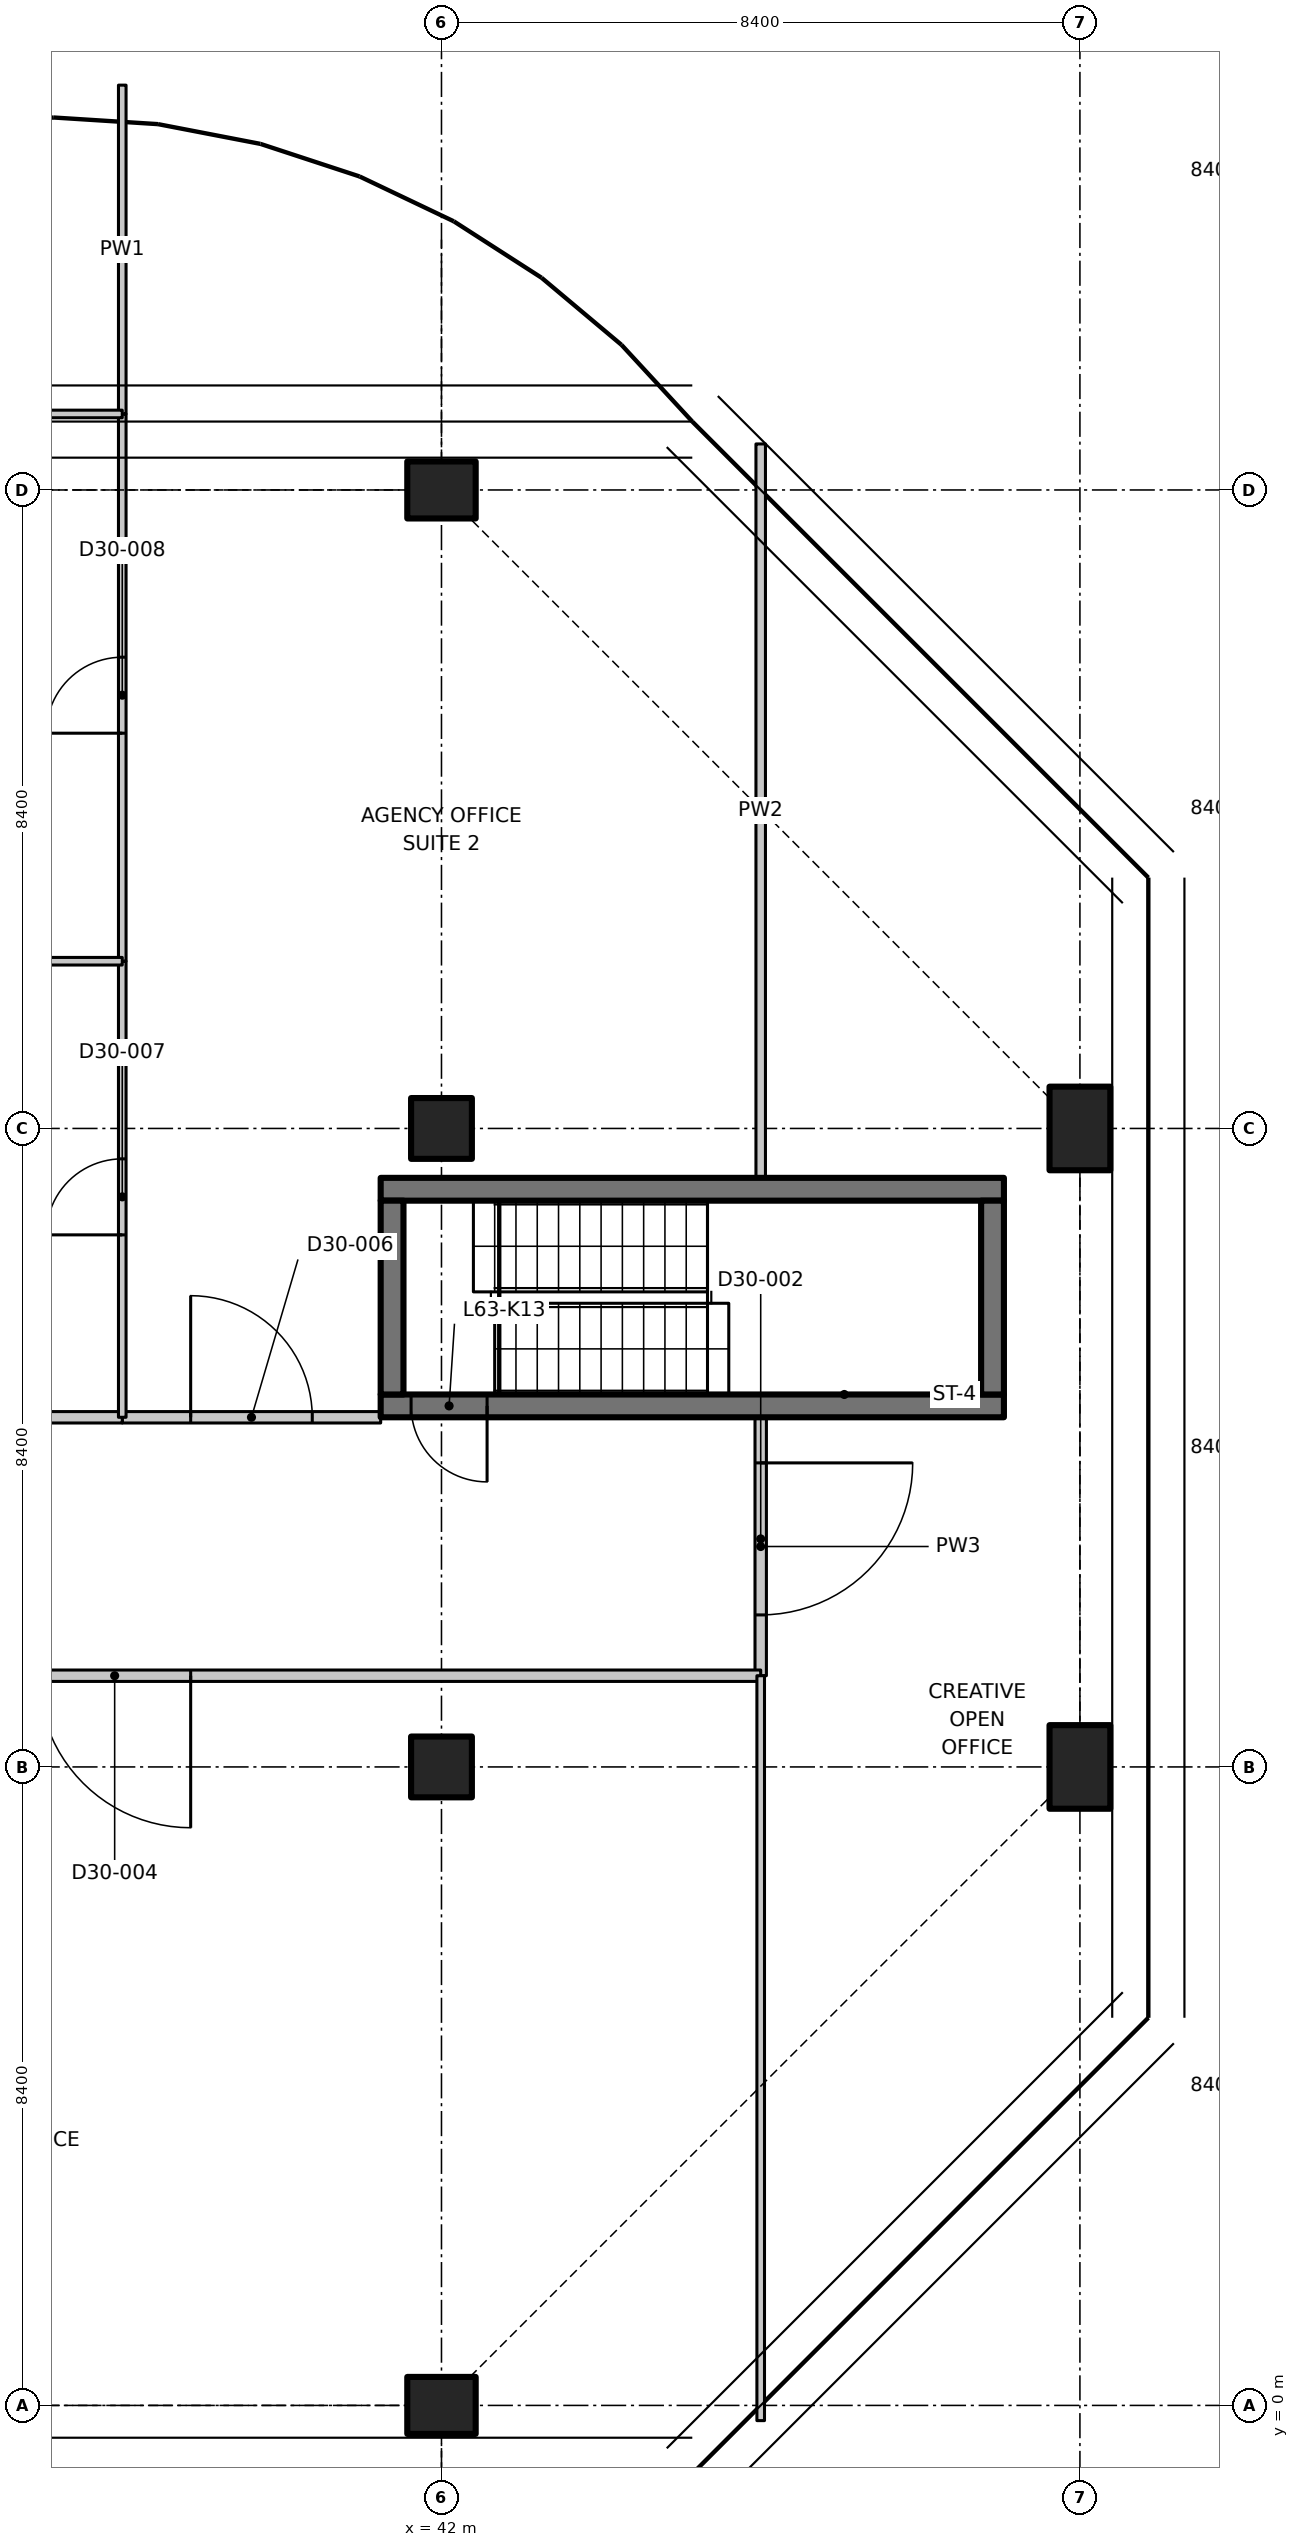
"""IFC4 building model, lengths in metres.
Left out: names, types, materials, properties, quantities, classifications, styles, units other than length and angle.
Written with IfcOpenShell. Run it as: python <this file> out.ifc"""

import sys

from ifc_helpers import new_model, si_unit, direction, frame, frame_2d, origin, origin_2d, place, context, subcontext, project, spatial, polyline, rectangle, outline, extrude, element, fill, save


model = new_model("IFC4")
c1 = context("Model", 3, precision=1e-05, world=origin(), true_north=direction((0.0, 1.0)))
c2 = subcontext(c1, "Body", "Model", "MODEL_VIEW")
j1 = project(units=[si_unit("LENGTHUNIT", "METRE"), si_unit("PLANEANGLEUNIT", "RADIAN")], contexts=[c1])
p1 = place(None, origin())
s1 = spatial("IfcSite", under=j1, at=p1, CompositionType="ELEMENT")
p2 = place(p1, origin())
s2 = spatial("IfcBuilding", under=s1, at=p2, CompositionType="ELEMENT")
p3 = place(p2, frame((0.0, 0.0, 248.1)))
s3 = spatial("IfcBuildingStorey", under=s2, at=p3, CompositionType="ELEMENT", Elevation=248.1)
p4 = place(p3, frame((42.0, 0.0, 0.0), z_axis=(0.0, 0.0, 1.0), x_axis=(0.0, 1.0, 0.0)))
e1 = element("IfcColumn", 1, at=p4, inside=s3, PredefinedType="COLUMN", context=c2, shape_type="SweptSolid", body=[
    extrude(rectangle(XDim=0.75, YDim=0.9, at=origin_2d()), origin(), (0.0, 0.0, 1.0), 3.35),
])
for number, where, z_axis, x_axis in (
    (2, (42.0, 8.4, 0.0), (0.0, 0.0, 1.0), (1.0, 0.0, 0.0)),
    (3, (42.0, 16.8, 0.0), (0.0, 0.0, 1.0), (1.0, 0.0, 0.0)),
):
    element("IfcColumn", number, at=place(p3, frame(where, z_axis=z_axis, x_axis=x_axis)), inside=s3, PredefinedType="COLUMN", context=c2, shape_type="SweptSolid", body=[
        extrude(rectangle(XDim=0.8, YDim=0.8, at=origin_2d()), origin(), (0.0, 0.0, 1.0), 3.35),
    ])
p5 = place(p3, frame((42.0, 25.2, 0.0), z_axis=(0.0, 0.0, 1.0), x_axis=(0.0, 1.0, 0.0)))
e4 = element("IfcColumn", 4, at=p5, inside=s3, PredefinedType="COLUMN", context=c2, shape_type="SweptSolid", body=[
    extrude(rectangle(XDim=0.75, YDim=0.9, at=origin_2d()), origin(), (0.0, 0.0, 1.0), 3.35),
])
for number, where, z_axis, x_axis in (
    (5, (50.4, 8.4, 0.0), (0.0, 0.0, 1.0), (1.0, 0.0, 0.0)),
    (6, (50.4, 16.8, 0.0), (0.0, 0.0, 1.0), (1.0, 0.0, 0.0)),
):
    element("IfcColumn", number, at=place(p3, frame(where, z_axis=z_axis, x_axis=x_axis)), inside=s3, PredefinedType="COLUMN", context=c2, shape_type="SweptSolid", body=[
        extrude(rectangle(XDim=0.8, YDim=1.1, at=origin_2d()), origin(), (0.0, 0.0, 1.0), 3.35),
    ])
p6 = place(p3, frame((49.4, 13.15, 0.0), z_axis=(0.0, 0.0, 1.0), x_axis=(-1.0, 0.0, 0.0)))
e7 = element("IfcWall", 7, at=p6, inside=s3, PredefinedType="SHEAR", context=c2, shape_type="SweptSolid", body=[
    extrude(rectangle(XDim=8.2, YDim=0.3, at=frame_2d((4.1, 0.0))), origin(), (0.0, 0.0, 1.0), 3.35),
])
p7 = place(p6, frame((6.8, 0.0, 0.0)))
e8 = element("IfcOpeningElement", 8, at=p7, cuts=e7, PredefinedType="OPENING", context=c2, shape_type="SweptSolid", body=[
    extrude(rectangle(XDim=1.0, YDim=2.1, at=frame_2d((0.5, 1.05))), frame((0.0, 0.16, 0.0), z_axis=(0.0, -1.0, 0.0), x_axis=(1.0, 0.0, 0.0)), (0.0, 0.0, 1.0), 0.32),
])
p8 = place(p3, frame((41.2, 16.0, 0.0), z_axis=(0.0, 0.0, 1.0), x_axis=(1.0, 0.0, 0.0)))
e9 = element("IfcWall", 9, at=p8, inside=s3, PredefinedType="SHEAR", context=c2, shape_type="SweptSolid", body=[
    extrude(rectangle(XDim=8.2, YDim=0.3, at=frame_2d((4.1, 0.0))), origin(), (0.0, 0.0, 1.0), 3.35),
])
for number, where, z_axis, x_axis in (
    (10, (41.35, 13.3, 0.0), (0.0, 0.0, 1.0), (0.0, 1.0, 0.0)),
    (11, (49.25, 13.3, 0.0), (0.0, 0.0, 1.0), (0.0, 1.0, 0.0)),
):
    element("IfcWall", number, at=place(p3, frame(where, z_axis=z_axis, x_axis=x_axis)), inside=s3, PredefinedType="SHEAR", context=c2, shape_type="SweptSolid", body=[
        extrude(rectangle(XDim=2.55, YDim=0.3, at=frame_2d((1.275, 0.0))), origin(), (0.0, 0.0, 1.0), 3.35),
    ])
p9 = place(p3, frame((46.2, 13.0, 0.0), z_axis=(0.0, 0.0, 1.0), x_axis=(0.0, -1.0, 0.0)))
e12 = element("IfcWall", 12, at=p9, inside=s3, PredefinedType="PARTITIONING", context=c2, shape_type="SweptSolid", body=[
    extrude(rectangle(XDim=3.4, YDim=0.15, at=frame_2d((1.7, 0.0))), origin(), (0.0, 0.0, 1.0), 3.33),
])
p10 = place(p9, frame((0.6, 0.0, 0.0)))
e13 = element("IfcOpeningElement", 13, at=p10, cuts=e12, PredefinedType="OPENING", context=c2, shape_type="SweptSolid", body=[
    extrude(rectangle(XDim=2.0, YDim=2.4, at=frame_2d((1.0, 1.2))), frame((0.0, 0.085, 0.0), z_axis=(0.0, -1.0, 0.0), x_axis=(1.0, 0.0, 0.0)), (0.0, 0.0, 1.0), 0.17),
])
p11 = place(p3, frame((46.2, 9.6, 0.0), z_axis=(0.0, 0.0, 1.0), x_axis=(-1.0, 0.0, 0.0)))
e14 = element("IfcWall", 14, at=p11, inside=s3, PredefinedType="PARTITIONING", context=c2, shape_type="SweptSolid", body=[
    extrude(rectangle(XDim=16.8, YDim=0.15, at=frame_2d((8.4, 0.0))), origin(), (0.0, 0.0, 1.0), 3.33),
])
p12 = place(p11, frame((7.5, 0.0, 0.0)))
e15 = element("IfcOpeningElement", 15, at=p12, cuts=e14, PredefinedType="OPENING", context=c2, shape_type="SweptSolid", body=[
    extrude(rectangle(XDim=2.0, YDim=2.4, at=frame_2d((1.0, 1.2))), frame((0.0, 0.085, 0.0), z_axis=(0.0, -1.0, 0.0), x_axis=(1.0, 0.0, 0.0)), (0.0, 0.0, 1.0), 0.17),
])
p13 = place(p3, frame((37.8, 13.0, 0.0), z_axis=(0.0, 0.0, 1.0), x_axis=(1.0, 0.0, 0.0)))
e16 = element("IfcWall", 16, at=p13, inside=s3, PredefinedType="PARTITIONING", context=c2, shape_type="SweptSolid", body=[
    extrude(rectangle(XDim=3.4, YDim=0.15, at=frame_2d((1.7, 0.0))), origin(), (0.0, 0.0, 1.0), 3.33),
])
p14 = place(p13, frame((0.9, 0.0, 0.0)))
e17 = element("IfcOpeningElement", 17, at=p14, cuts=e16, PredefinedType="OPENING", context=c2, shape_type="SweptSolid", body=[
    extrude(rectangle(XDim=1.6, YDim=2.1, at=frame_2d((0.8, 1.05))), frame((0.0, 0.085, 0.0), z_axis=(0.0, -1.0, 0.0), x_axis=(1.0, 0.0, 0.0)), (0.0, 0.0, 1.0), 0.17),
])
p15 = place(p3, frame((33.6, 13.0, 0.0), z_axis=(0.0, 0.0, 1.0), x_axis=(1.0, 0.0, 0.0)))
e18 = element("IfcWall", 18, at=p15, inside=s3, PredefinedType="PARTITIONING", context=c2, shape_type="SweptSolid", body=[
    extrude(rectangle(XDim=4.2, YDim=0.15, at=frame_2d((2.1, 0.0))), origin(), (0.0, 0.0, 1.0), 3.33),
])
p16 = place(p3, frame((46.2, -0.2, 0.0), z_axis=(0.0, 0.0, 1.0), x_axis=(0.0, 1.0, 0.0)))
e19 = element("IfcWall", 19, at=p16, inside=s3, PredefinedType="PARTITIONING", context=c2, shape_type="SweptSolid", body=[
    extrude(outline(polyline([(0.0, 0.0), (9.8, 0.0), (9.8, 3.33), (5.066, 3.33), (5.064, 2.98), (3.736, 2.98), (3.734, 3.33), (0.0, 3.33), (0.0, 0.0)])), frame((0.0, 0.05, 0.0), z_axis=(0.0, -1.0, 0.0), x_axis=(1.0, 0.0, 0.0)), (0.0, 0.0, 1.0), 0.1),
])
p17 = place(p3, frame((46.2, 16.15, 0.0), z_axis=(0.0, 0.0, 1.0), x_axis=(0.0, 1.0, 0.0)))
e20 = element("IfcWall", 20, at=p17, inside=s3, PredefinedType="PARTITIONING", context=c2, shape_type="SweptSolid", body=[
    extrude(outline(polyline([(0.0, 0.0), (9.656, 0.0), (9.656, 3.33), (9.25, 3.33), (5.528, 3.33), (5.526, 2.98), (4.174, 2.98), (4.172, 3.33), (0.0, 3.33), (0.0, 0.0)])), frame((0.0, 0.062, 0.0), z_axis=(0.0, -1.0, 0.0), x_axis=(1.0, 0.0, 0.0)), (0.0, 0.0, 1.0), 0.125),
])
p18 = place(p3, frame((37.8, 13.0, 0.0), z_axis=(0.0, 0.0, 1.0), x_axis=(0.0, 1.0, 0.0)))
e21 = element("IfcWall", 21, at=p18, inside=s3, PredefinedType="PARTITIONING", context=c2, shape_type="SweptSolid", body=[
    extrude(rectangle(XDim=6.0, YDim=0.1, at=frame_2d((3.0, 0.0))), origin(), (0.0, 0.0, 1.0), 3.33),
])
p19 = place(p18, frame((2.4, 0.0, 0.0)))
e22 = element("IfcOpeningElement", 22, at=p19, cuts=e21, PredefinedType="OPENING", context=c2, shape_type="SweptSolid", body=[
    extrude(rectangle(XDim=1.0, YDim=2.1, at=frame_2d((0.5, 1.05))), frame((0.0, 0.06, 0.0), z_axis=(0.0, -1.0, 0.0), x_axis=(1.0, 0.0, 0.0)), (0.0, 0.0, 1.0), 0.12),
])
p20 = place(p3, frame((37.8, 19.0, 0.0), z_axis=(0.0, 0.0, 1.0), x_axis=(0.0, 1.0, 0.0)))
e23 = element("IfcWall", 23, at=p20, inside=s3, PredefinedType="PARTITIONING", context=c2, shape_type="SweptSolid", body=[
    extrude(outline(polyline([(0.0, 0.0), (7.2, 0.0), (7.2, 3.33), (6.65, 3.33), (6.648, 2.98), (5.752, 2.98), (5.75, 3.33), (0.0, 3.33), (0.0, 0.0)])), frame((0.0, 0.05, 0.0), z_axis=(0.0, -1.0, 0.0), x_axis=(1.0, 0.0, 0.0)), (0.0, 0.0, 1.0), 0.1),
])
p21 = place(p20, frame((3.0, 0.0, 0.0)))
e24 = element("IfcOpeningElement", 24, at=p21, cuts=e23, PredefinedType="OPENING", context=c2, shape_type="SweptSolid", body=[
    extrude(rectangle(XDim=1.0, YDim=2.1, at=frame_2d((0.5, 1.05))), frame((0.0, 0.06, 0.0), z_axis=(0.0, -1.0, 0.0), x_axis=(1.0, 0.0, 0.0)), (0.0, 0.0, 1.0), 0.12),
])
p22 = place(p3, frame((37.8, 26.2, 0.0), z_axis=(0.0, 0.0, 1.0), x_axis=(0.0, 1.0, 0.0)))
e25 = element("IfcWall", 25, at=p22, inside=s3, PredefinedType="PARTITIONING", context=c2, shape_type="SweptSolid", body=[
    extrude(rectangle(XDim=4.326, YDim=0.1, at=frame_2d((2.163, 0.0))), origin(), (0.0, 0.0, 1.0), 3.33),
])
p23 = place(p3, frame((33.6, 19.0, 0.0), z_axis=(0.0, 0.0, 1.0), x_axis=(1.0, 0.0, 0.0)))
e26 = element("IfcWall", 26, at=p23, inside=s3, PredefinedType="PARTITIONING", context=c2, shape_type="SweptSolid", body=[
    extrude(rectangle(XDim=4.2, YDim=0.1, at=frame_2d((2.1, 0.0))), origin(), (0.0, 0.0, 1.0), 3.33),
])
p24 = place(p3, frame((33.6, 26.2, 0.0), z_axis=(0.0, 0.0, 1.0), x_axis=(1.0, 0.0, 0.0)))
e27 = element("IfcWall", 27, at=p24, inside=s3, PredefinedType="PARTITIONING", context=c2, shape_type="SweptSolid", body=[
    extrude(rectangle(XDim=4.2, YDim=0.1, at=frame_2d((2.1, 0.0))), origin(), (0.0, 0.0, 1.0), 2.98),
])
p25 = place(p24, frame((1.8, 0.0, 0.0)))
e28 = element("IfcOpeningElement", 28, at=p25, cuts=e27, PredefinedType="OPENING", context=c2, shape_type="SweptSolid", body=[
    extrude(rectangle(XDim=0.9, YDim=2.1, at=frame_2d((0.45, 1.05))), frame((0.0, 0.06, 0.0), z_axis=(0.0, -1.0, 0.0), x_axis=(1.0, 0.0, 0.0)), (0.0, 0.0, 1.0), 0.12),
])
p26 = place(p7, origin())
e29 = element("IfcDoor", 29, at=p26, inside=s3, OperationType="SINGLE_SWING_RIGHT", PredefinedType="DOOR", context=c2, shape_type="SweptSolid", body=[
    extrude(rectangle(XDim=1.0, YDim=2.1, at=frame_2d((0.5, 1.05))), frame((0.0, 0.025, 0.0), z_axis=(0.0, -1.0, 0.0), x_axis=(1.0, 0.0, 0.0)), (0.0, 0.0, 1.0), 0.05),
])
fill(e8, e29)
p27 = place(p10, origin())
e30 = element("IfcDoor", 30, at=p27, inside=s3, OperationType="DOUBLE_DOOR_SINGLE_SWING", PredefinedType="DOOR", context=c2, shape_type="SweptSolid", body=[
    extrude(rectangle(XDim=2.0, YDim=2.4, at=frame_2d((1.0, 1.2))), frame((0.0, 0.025, 0.0), z_axis=(0.0, -1.0, 0.0), x_axis=(1.0, 0.0, 0.0)), (0.0, 0.0, 1.0), 0.05),
])
fill(e13, e30)
p28 = place(p12, origin())
e31 = element("IfcDoor", 31, at=p28, inside=s3, OperationType="DOUBLE_DOOR_SINGLE_SWING", PredefinedType="DOOR", context=c2, shape_type="SweptSolid", body=[
    extrude(rectangle(XDim=2.0, YDim=2.4, at=frame_2d((1.0, 1.2))), frame((0.0, 0.025, 0.0), z_axis=(0.0, -1.0, 0.0), x_axis=(1.0, 0.0, 0.0)), (0.0, 0.0, 1.0), 0.05),
])
fill(e15, e31)
p29 = place(p14, origin())
e32 = element("IfcDoor", 32, at=p29, inside=s3, OperationType="DOUBLE_DOOR_SINGLE_SWING", PredefinedType="DOOR", context=c2, shape_type="SweptSolid", body=[
    extrude(rectangle(XDim=1.6, YDim=2.1, at=frame_2d((0.8, 1.05))), frame((0.0, 0.025, 0.0), z_axis=(0.0, -1.0, 0.0), x_axis=(1.0, 0.0, 0.0)), (0.0, 0.0, 1.0), 0.05),
])
fill(e17, e32)
p30 = place(p19, origin())
e33 = element("IfcDoor", 33, at=p30, inside=s3, OperationType="SINGLE_SWING_LEFT", PredefinedType="DOOR", context=c2, shape_type="SweptSolid", body=[
    extrude(rectangle(XDim=1.0, YDim=2.1, at=frame_2d((0.5, 1.05))), frame((0.0, 0.025, 0.0), z_axis=(0.0, -1.0, 0.0), x_axis=(1.0, 0.0, 0.0)), (0.0, 0.0, 1.0), 0.05),
])
fill(e22, e33)
p31 = place(p21, origin())
e34 = element("IfcDoor", 34, at=p31, inside=s3, OperationType="SINGLE_SWING_LEFT", PredefinedType="DOOR", context=c2, shape_type="SweptSolid", body=[
    extrude(rectangle(XDim=1.0, YDim=2.1, at=frame_2d((0.5, 1.05))), frame((0.0, 0.025, 0.0), z_axis=(0.0, -1.0, 0.0), x_axis=(1.0, 0.0, 0.0)), (0.0, 0.0, 1.0), 0.05),
])
fill(e24, e34)
save(model, sys.argv[1])
